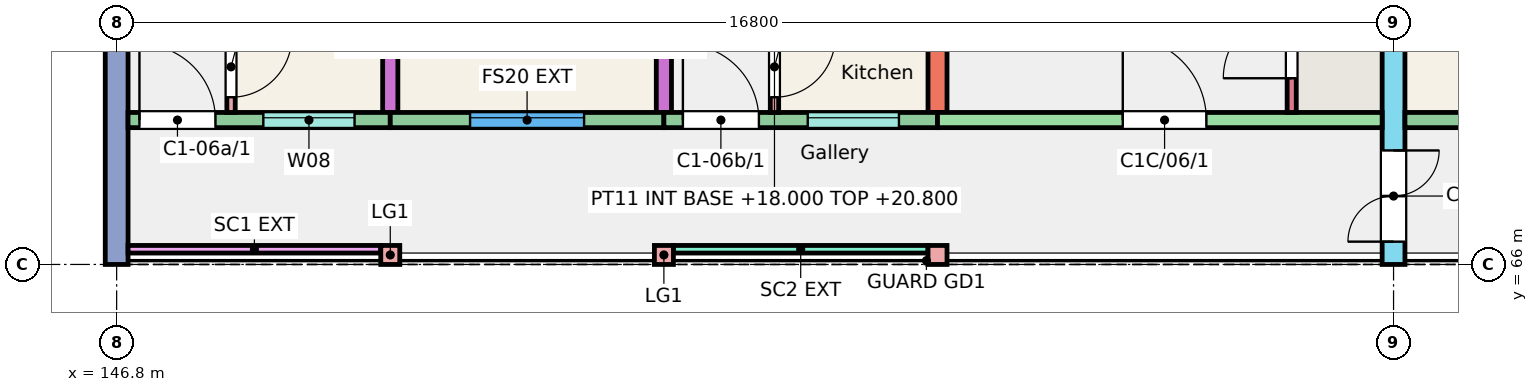
"""IFC4 building model, lengths in metres.
Left out: names, types, materials, properties, quantities, classifications, styles, units other than length and angle.
Written with IfcOpenShell. Run it as: python <this file> out.ifc"""

import sys

from ifc_helpers import new_model, si_unit, direction, frame, frame_2d, origin, origin_2d, place, context, subcontext, project, spatial, rectangle, extrude, element, fill, save


model = new_model("IFC4")
c1 = context("Model", 3, precision=1e-05, world=origin(), true_north=direction((0.0, 1.0)))
c2 = subcontext(c1, "Body", "Model", "MODEL_VIEW")
j1 = project(units=[si_unit("LENGTHUNIT", "METRE"), si_unit("PLANEANGLEUNIT", "RADIAN")], contexts=[c1])
p1 = place(None, origin())
s1 = spatial("IfcSite", under=j1, at=p1, CompositionType="ELEMENT")
p2 = place(p1, origin())
s2 = spatial("IfcBuilding", under=s1, at=p2, CompositionType="ELEMENT")
p3 = place(p2, frame((0.0, 0.0, 18.0)))
s3 = spatial("IfcBuildingStorey", under=s2, at=p3, CompositionType="ELEMENT", Elevation=18.0)
p4 = place(p3, frame((146.8, 66.0, 0.0), z_axis=(0.0, 0.0, 1.0), x_axis=(0.0, 1.0, 0.0)))
e1 = element("IfcWall", 1, at=p4, inside=s3, PredefinedType="SHEAR", context=c2, shape_type="SweptSolid", body=[
    extrude(rectangle(XDim=11.0, YDim=0.3, at=frame_2d((5.5, 0.0))), origin(), (0.0, 0.0, 1.0), 3.0),
])
p5 = place(p4, frame((8.005, 0.0, 0.9)))
e2 = element("IfcOpeningElement", 2, at=p5, cuts=e1, PredefinedType="OPENING", context=c2, shape_type="SweptSolid", body=[
    extrude(rectangle(XDim=1.8, YDim=1.5, at=frame_2d((0.9, 0.75))), frame((0.0, 0.16, 0.0), z_axis=(0.0, -1.0, 0.0), x_axis=(1.0, 0.0, 0.0)), (0.0, 0.0, 1.0), 0.32),
])
p6 = place(p3, frame((150.4, 68.0, 0.0), z_axis=(0.0, 0.0, 1.0), x_axis=(0.0, 1.0, 0.0)))
e3 = element("IfcWall", 3, at=p6, inside=s3, PredefinedType="SHEAR", context=c2, shape_type="SweptSolid", body=[
    extrude(rectangle(XDim=9.0, YDim=0.2, at=frame_2d((4.5, 0.0))), origin(), (0.0, 0.0, 1.0), 3.0),
])
p7 = place(p3, frame((154.0, 68.0, 0.0), z_axis=(0.0, 0.0, 1.0), x_axis=(0.0, 1.0, 0.0)))
e4 = element("IfcWall", 4, at=p7, inside=s3, PredefinedType="SHEAR", context=c2, shape_type="SweptSolid", body=[
    extrude(rectangle(XDim=9.0, YDim=0.2, at=frame_2d((4.5, 0.0))), origin(), (0.0, 0.0, 1.0), 3.0),
])
p8 = place(p7, frame((2.4, 0.0, 0.0)))
e5 = element("IfcOpeningElement", 5, at=p8, cuts=e4, PredefinedType="OPENING", context=c2, shape_type="SweptSolid", body=[
    extrude(rectangle(XDim=1.2, YDim=2.1, at=frame_2d((0.6, 1.05))), frame((0.0, 0.11, 0.0), z_axis=(0.0, -1.0, 0.0), x_axis=(1.0, 0.0, 0.0)), (0.0, 0.0, 1.0), 0.22),
])
p9 = place(p7, frame((6.4, 0.0, 0.0)))
e6 = element("IfcOpeningElement", 6, at=p9, cuts=e4, PredefinedType="OPENING", context=c2, shape_type="SweptSolid", body=[
    extrude(rectangle(XDim=1.2, YDim=2.1, at=frame_2d((0.6, 1.05))), frame((0.0, 0.11, 0.0), z_axis=(0.0, -1.0, 0.0), x_axis=(1.0, 0.0, 0.0)), (0.0, 0.0, 1.0), 0.22),
])
p10 = place(p3, frame((157.6, 68.0, 0.0), z_axis=(0.0, 0.0, 1.0), x_axis=(0.0, 1.0, 0.0)))
e7 = element("IfcWall", 7, at=p10, inside=s3, PredefinedType="SHEAR", context=c2, shape_type="SweptSolid", body=[
    extrude(rectangle(XDim=9.0, YDim=0.25, at=frame_2d((4.5, 0.0))), origin(), (0.0, 0.0, 1.0), 3.0),
])
p11 = place(p3, frame((163.6, 66.0, 0.0), z_axis=(0.0, 0.0, 1.0), x_axis=(0.0, 1.0, 0.0)))
e8 = element("IfcWall", 8, at=p11, inside=s3, PredefinedType="SHEAR", context=c2, shape_type="SweptSolid", body=[
    extrude(rectangle(XDim=11.0, YDim=0.3, at=frame_2d((5.5, 0.0))), origin(), (0.0, 0.0, 1.0), 3.0),
])
p12 = place(p11, frame((0.3, 0.0, 0.0)))
e9 = element("IfcOpeningElement", 9, at=p12, cuts=e8, PredefinedType="OPENING", context=c2, shape_type="SweptSolid", body=[
    extrude(rectangle(XDim=1.2, YDim=2.1, at=frame_2d((0.6, 1.05))), frame((0.0, 0.16, 0.0), z_axis=(0.0, -1.0, 0.0), x_axis=(1.0, 0.0, 0.0)), (0.0, 0.0, 1.0), 0.32),
])
p13 = place(p3, frame((146.95, 67.9, 0.0), z_axis=(0.0, 0.0, 1.0), x_axis=(1.0, 0.0, 0.0)))
e10 = element("IfcWall", 10, at=p13, inside=s3, PredefinedType="SOLIDWALL", context=c2, shape_type="SweptSolid", body=[
    extrude(rectangle(XDim=3.45, YDim=0.2, at=frame_2d((1.725, 0.0))), origin(), (0.0, 0.0, 1.0), 3.0),
])
p14 = place(p13, frame((1.78, 0.0, 1.1)))
e11 = element("IfcOpeningElement", 11, at=p14, cuts=e10, PredefinedType="OPENING", context=c2, shape_type="SweptSolid", body=[
    extrude(rectangle(XDim=1.2, YDim=1.3, at=frame_2d((0.6, 0.65))), frame((0.0, 0.11, 0.0), z_axis=(0.0, -1.0, 0.0), x_axis=(1.0, 0.0, 0.0)), (0.0, 0.0, 1.0), 0.22),
])
p15 = place(p13, frame((0.15, 0.0, 0.0)))
e12 = element("IfcOpeningElement", 12, at=p15, cuts=e10, PredefinedType="OPENING", context=c2, shape_type="SweptSolid", body=[
    extrude(rectangle(XDim=1.0, YDim=2.1, at=frame_2d((0.5, 1.05))), frame((0.0, 0.11, 0.0), z_axis=(0.0, -1.0, 0.0), x_axis=(1.0, 0.0, 0.0)), (0.0, 0.0, 1.0), 0.22),
])
p16 = place(p3, frame((150.4, 67.9, 0.0), z_axis=(0.0, 0.0, 1.0), x_axis=(1.0, 0.0, 0.0)))
e13 = element("IfcWall", 13, at=p16, inside=s3, PredefinedType="SOLIDWALL", context=c2, shape_type="SweptSolid", body=[
    extrude(rectangle(XDim=3.6, YDim=0.2, at=frame_2d((1.8, 0.0))), origin(), (0.0, 0.0, 1.0), 3.0),
])
p17 = place(p16, frame((1.05, 0.0, 0.9)))
e14 = element("IfcOpeningElement", 14, at=p17, cuts=e13, PredefinedType="OPENING", context=c2, shape_type="SweptSolid", body=[
    extrude(rectangle(XDim=1.5, YDim=1.5, at=frame_2d((0.75, 0.75))), frame((0.0, 0.11, 0.0), z_axis=(0.0, -1.0, 0.0), x_axis=(1.0, 0.0, 0.0)), (0.0, 0.0, 1.0), 0.22),
])
p18 = place(p3, frame((154.0, 67.9, 0.0), z_axis=(0.0, 0.0, 1.0), x_axis=(1.0, 0.0, 0.0)))
e15 = element("IfcWall", 15, at=p18, inside=s3, PredefinedType="SOLIDWALL", context=c2, shape_type="SweptSolid", body=[
    extrude(rectangle(XDim=3.6, YDim=0.2, at=frame_2d((1.8, 0.0))), origin(), (0.0, 0.0, 1.0), 3.0),
])
p19 = place(p18, frame((1.893, 0.0, 1.1)))
e16 = element("IfcOpeningElement", 16, at=p19, cuts=e15, PredefinedType="OPENING", context=c2, shape_type="SweptSolid", body=[
    extrude(rectangle(XDim=1.2, YDim=1.3, at=frame_2d((0.6, 0.65))), frame((0.0, 0.11, 0.0), z_axis=(0.0, -1.0, 0.0), x_axis=(1.0, 0.0, 0.0)), (0.0, 0.0, 1.0), 0.22),
])
p20 = place(p18, frame((0.25, 0.0, 0.0)))
e17 = element("IfcOpeningElement", 17, at=p20, cuts=e15, PredefinedType="OPENING", context=c2, shape_type="SweptSolid", body=[
    extrude(rectangle(XDim=1.0, YDim=2.1, at=frame_2d((0.5, 1.05))), frame((0.0, 0.11, 0.0), z_axis=(0.0, -1.0, 0.0), x_axis=(1.0, 0.0, 0.0)), (0.0, 0.0, 1.0), 0.22),
])
p21 = place(p3, frame((157.6, 67.9, 0.0), z_axis=(0.0, 0.0, 1.0), x_axis=(1.0, 0.0, 0.0)))
e18 = element("IfcWall", 18, at=p21, inside=s3, PredefinedType="SHEAR", context=c2, shape_type="SweptSolid", body=[
    extrude(rectangle(XDim=5.85, YDim=0.2, at=frame_2d((2.925, 0.0))), origin(), (0.0, 0.0, 1.0), 3.0),
])
p22 = place(p21, frame((2.438, 0.0, 0.0)))
e19 = element("IfcOpeningElement", 19, at=p22, cuts=e18, PredefinedType="OPENING", context=c2, shape_type="SweptSolid", body=[
    extrude(rectangle(XDim=1.1, YDim=2.1, at=frame_2d((0.55, 1.05))), frame((0.0, 0.11, 0.0), z_axis=(0.0, -1.0, 0.0), x_axis=(1.0, 0.0, 0.0)), (0.0, 0.0, 1.0), 0.22),
])
p23 = place(p3, frame((162.26, 68.0, 0.0), z_axis=(0.0, 0.0, 1.0), x_axis=(0.0, 1.0, 0.0)))
e20 = element("IfcWall", 20, at=p23, inside=s3, PredefinedType="SHEAR", context=c2, shape_type="SweptSolid", body=[
    extrude(rectangle(XDim=1.72, YDim=0.12, at=frame_2d((0.86, 0.0))), origin(), (0.0, 0.0, 1.0), 3.0),
])
p24 = place(p23, frame((0.45, 0.0, 0.0)))
e21 = element("IfcOpeningElement", 21, at=p24, cuts=e20, PredefinedType="OPENING", context=c2, shape_type="SweptSolid", body=[
    extrude(rectangle(XDim=0.9, YDim=2.1, at=frame_2d((0.45, 1.05))), frame((0.0, 0.07, 0.0), z_axis=(0.0, -1.0, 0.0), x_axis=(1.0, 0.0, 0.0)), (0.0, 0.0, 1.0), 0.14),
])
p25 = place(p3, frame((163.75, 67.9, 0.0), z_axis=(0.0, 0.0, 1.0), x_axis=(1.0, 0.0, 0.0)))
e22 = element("IfcWall", 22, at=p25, inside=s3, PredefinedType="SOLIDWALL", context=c2, shape_type="SweptSolid", body=[
    extrude(rectangle(XDim=3.45, YDim=0.2, at=frame_2d((1.725, 0.0))), origin(), (0.0, 0.0, 1.0), 3.0),
])
p26 = place(p25, frame((0.925, 0.0, 0.9)))
e23 = element("IfcOpeningElement", 23, at=p26, cuts=e22, PredefinedType="OPENING", context=c2, shape_type="SweptSolid", body=[
    extrude(rectangle(XDim=1.5, YDim=1.5, at=frame_2d((0.75, 0.75))), frame((0.0, 0.11, 0.0), z_axis=(0.0, -1.0, 0.0), x_axis=(1.0, 0.0, 0.0)), (0.0, 0.0, 1.0), 0.22),
])
for number, where, z_axis, x_axis in (
    (24, (150.4, 66.125, 0.0), (0.0, 0.0, 1.0), (1.0, 0.0, 0.0)),
    (25, (154.0, 66.125, 0.0), (0.0, 0.0, 1.0), (1.0, 0.0, 0.0)),
    (26, (157.6, 66.125, 0.0), (0.0, 0.0, 1.0), (1.0, 0.0, 0.0)),
):
    element("IfcColumn", number, at=place(p3, frame(where, z_axis=z_axis, x_axis=x_axis)), inside=s3, PredefinedType="COLUMN", context=c2, shape_type="SweptSolid", body=[
        extrude(rectangle(XDim=0.25, YDim=0.25, at=origin_2d()), origin(), (0.0, 0.0, 1.0), 3.0),
    ])
p27 = place(p3, frame((146.95, 66.2, 0.0), z_axis=(0.0, 0.0, 1.0), x_axis=(1.0, 0.0, 0.0)))
e27 = element("IfcWall", 27, at=p27, inside=s3, PredefinedType="SOLIDWALL", context=c2, shape_type="SweptSolid", body=[
    extrude(rectangle(XDim=3.325, YDim=0.1, at=frame_2d((1.663, 0.0))), origin(), (0.0, 0.0, 1.0), 2.45),
])
p28 = place(p3, frame((154.125, 66.2, 0.0), z_axis=(0.0, 0.0, 1.0), x_axis=(1.0, 0.0, 0.0)))
e28 = element("IfcWall", 28, at=p28, inside=s3, PredefinedType="SOLIDWALL", context=c2, shape_type="SweptSolid", body=[
    extrude(rectangle(XDim=3.35, YDim=0.1, at=frame_2d((1.675, 0.0))), origin(), (0.0, 0.0, 1.0), 2.45),
])
p29 = place(p3, frame((148.305, 68.0, 0.0), z_axis=(0.0, 0.0, 1.0), x_axis=(0.0, 1.0, 0.0)))
e29 = element("IfcWall", 29, at=p29, inside=s3, PredefinedType="PARTITIONING", context=c2, shape_type="SweptSolid", body=[
    extrude(rectangle(XDim=4.7, YDim=0.11, at=frame_2d((2.35, 0.0))), origin(), (0.0, 0.0, 1.0), 2.8),
])
p30 = place(p29, frame((0.2, 0.0, 0.0)))
e30 = element("IfcOpeningElement", 30, at=p30, cuts=e29, PredefinedType="OPENING", context=c2, shape_type="SweptSolid", body=[
    extrude(rectangle(XDim=0.8, YDim=2.1, at=frame_2d((0.4, 1.05))), frame((0.0, 0.065, 0.0), z_axis=(0.0, -1.0, 0.0), x_axis=(1.0, 0.0, 0.0)), (0.0, 0.0, 1.0), 0.13),
])
p31 = place(p29, frame((3.75, 0.0, 0.0)))
e31 = element("IfcOpeningElement", 31, at=p31, cuts=e29, PredefinedType="OPENING", context=c2, shape_type="SweptSolid", body=[
    extrude(rectangle(XDim=0.8, YDim=2.1, at=frame_2d((0.4, 1.05))), frame((0.0, 0.065, 0.0), z_axis=(0.0, -1.0, 0.0), x_axis=(1.0, 0.0, 0.0)), (0.0, 0.0, 1.0), 0.13),
])
p32 = place(p3, frame((155.455, 68.0, 0.0), z_axis=(0.0, 0.0, 1.0), x_axis=(0.0, 1.0, 0.0)))
e32 = element("IfcWall", 32, at=p32, inside=s3, PredefinedType="PARTITIONING", context=c2, shape_type="SweptSolid", body=[
    extrude(rectangle(XDim=4.5, YDim=0.11, at=frame_2d((2.25, 0.0))), origin(), (0.0, 0.0, 1.0), 2.8),
])
p33 = place(p32, frame((0.2, 0.0, 0.0)))
e33 = element("IfcOpeningElement", 33, at=p33, cuts=e32, PredefinedType="OPENING", context=c2, shape_type="SweptSolid", body=[
    extrude(rectangle(XDim=0.8, YDim=2.1, at=frame_2d((0.4, 1.05))), frame((0.0, 0.065, 0.0), z_axis=(0.0, -1.0, 0.0), x_axis=(1.0, 0.0, 0.0)), (0.0, 0.0, 1.0), 0.13),
])
p34 = place(p32, frame((3.55, 0.0, 0.0)))
e34 = element("IfcOpeningElement", 34, at=p34, cuts=e32, PredefinedType="OPENING", context=c2, shape_type="SweptSolid", body=[
    extrude(rectangle(XDim=0.8, YDim=2.1, at=frame_2d((0.4, 1.05))), frame((0.0, 0.065, 0.0), z_axis=(0.0, -1.0, 0.0), x_axis=(1.0, 0.0, 0.0)), (0.0, 0.0, 1.0), 0.13),
])
p35 = place(p14, origin())
e35 = element("IfcWindow", 35, at=p35, inside=s3, PartitioningType="SINGLE_PANEL", PredefinedType="WINDOW", context=c2, shape_type="SweptSolid", body=[
    extrude(rectangle(XDim=1.2, YDim=1.3, at=frame_2d((0.6, 0.65))), frame((0.0, 0.06, 0.0), z_axis=(0.0, -1.0, 0.0), x_axis=(1.0, 0.0, 0.0)), (0.0, 0.0, 1.0), 0.06),
])
fill(e11, e35)
p36 = place(p17, origin())
e36 = element("IfcWindow", 36, at=p36, inside=s3, PartitioningType="SINGLE_PANEL", PredefinedType="WINDOW", context=c2, shape_type="SweptSolid", body=[
    extrude(rectangle(XDim=1.5, YDim=1.5, at=frame_2d((0.75, 0.75))), frame((0.0, 0.06, 0.0), z_axis=(0.0, -1.0, 0.0), x_axis=(1.0, 0.0, 0.0)), (0.0, 0.0, 1.0), 0.06),
])
fill(e14, e36)
p37 = place(p19, origin())
e37 = element("IfcWindow", 37, at=p37, inside=s3, PartitioningType="SINGLE_PANEL", PredefinedType="WINDOW", context=c2, shape_type="SweptSolid", body=[
    extrude(rectangle(XDim=1.2, YDim=1.3, at=frame_2d((0.6, 0.65))), frame((0.0, 0.06, 0.0), z_axis=(0.0, -1.0, 0.0), x_axis=(1.0, 0.0, 0.0)), (0.0, 0.0, 1.0), 0.06),
])
fill(e16, e37)
p38 = place(p15, origin())
e38 = element("IfcDoor", 38, at=p38, inside=s3, OperationType="SINGLE_SWING_LEFT", PredefinedType="DOOR", context=c2, shape_type="SweptSolid", body=[
    extrude(rectangle(XDim=1.0, YDim=2.1, at=frame_2d((0.5, 1.05))), frame((0.0, 0.025, 0.0), z_axis=(0.0, -1.0, 0.0), x_axis=(1.0, 0.0, 0.0)), (0.0, 0.0, 1.0), 0.05),
])
fill(e12, e38)
p39 = place(p30, origin())
e39 = element("IfcDoor", 39, at=p39, inside=s3, OperationType="SINGLE_SWING_RIGHT", PredefinedType="DOOR", context=c2, shape_type="SweptSolid", body=[
    extrude(rectangle(XDim=0.8, YDim=2.1, at=frame_2d((0.4, 1.05))), frame((0.0, 0.025, 0.0), z_axis=(0.0, -1.0, 0.0), x_axis=(1.0, 0.0, 0.0)), (0.0, 0.0, 1.0), 0.05),
])
fill(e30, e39)
p40 = place(p20, origin())
e40 = element("IfcDoor", 40, at=p40, inside=s3, OperationType="SINGLE_SWING_LEFT", PredefinedType="DOOR", context=c2, shape_type="SweptSolid", body=[
    extrude(rectangle(XDim=1.0, YDim=2.1, at=frame_2d((0.5, 1.05))), frame((0.0, 0.025, 0.0), z_axis=(0.0, -1.0, 0.0), x_axis=(1.0, 0.0, 0.0)), (0.0, 0.0, 1.0), 0.05),
])
fill(e17, e40)
p41 = place(p33, origin())
e41 = element("IfcDoor", 41, at=p41, inside=s3, OperationType="SINGLE_SWING_RIGHT", PredefinedType="DOOR", context=c2, shape_type="SweptSolid", body=[
    extrude(rectangle(XDim=0.8, YDim=2.1, at=frame_2d((0.4, 1.05))), frame((0.0, 0.025, 0.0), z_axis=(0.0, -1.0, 0.0), x_axis=(1.0, 0.0, 0.0)), (0.0, 0.0, 1.0), 0.05),
])
fill(e33, e41)
p42 = place(p22, origin())
e42 = element("IfcDoor", 42, at=p42, inside=s3, OperationType="SINGLE_SWING_LEFT", PredefinedType="DOOR", context=c2, shape_type="SweptSolid", body=[
    extrude(rectangle(XDim=1.1, YDim=2.1, at=frame_2d((0.55, 1.05))), frame((0.0, 0.025, 0.0), z_axis=(0.0, -1.0, 0.0), x_axis=(1.0, 0.0, 0.0)), (0.0, 0.0, 1.0), 0.05),
])
fill(e19, e42)
p43 = place(p24, origin())
e43 = element("IfcDoor", 43, at=p43, inside=s3, OperationType="SINGLE_SWING_LEFT", PredefinedType="DOOR", context=c2, shape_type="SweptSolid", body=[
    extrude(rectangle(XDim=0.9, YDim=2.1, at=frame_2d((0.45, 1.05))), frame((0.0, 0.025, 0.0), z_axis=(0.0, -1.0, 0.0), x_axis=(1.0, 0.0, 0.0)), (0.0, 0.0, 1.0), 0.05),
])
fill(e21, e43)
p44 = place(p12, origin())
e44 = element("IfcDoor", 44, at=p44, inside=s3, OperationType="DOUBLE_DOOR_SINGLE_SWING", PredefinedType="DOOR", context=c2, shape_type="SweptSolid", body=[
    extrude(rectangle(XDim=1.2, YDim=2.1, at=frame_2d((0.6, 1.05))), frame((0.0, 0.025, 0.0), z_axis=(0.0, -1.0, 0.0), x_axis=(1.0, 0.0, 0.0)), (0.0, 0.0, 1.0), 0.05),
])
fill(e9, e44)
save(model, sys.argv[1])
